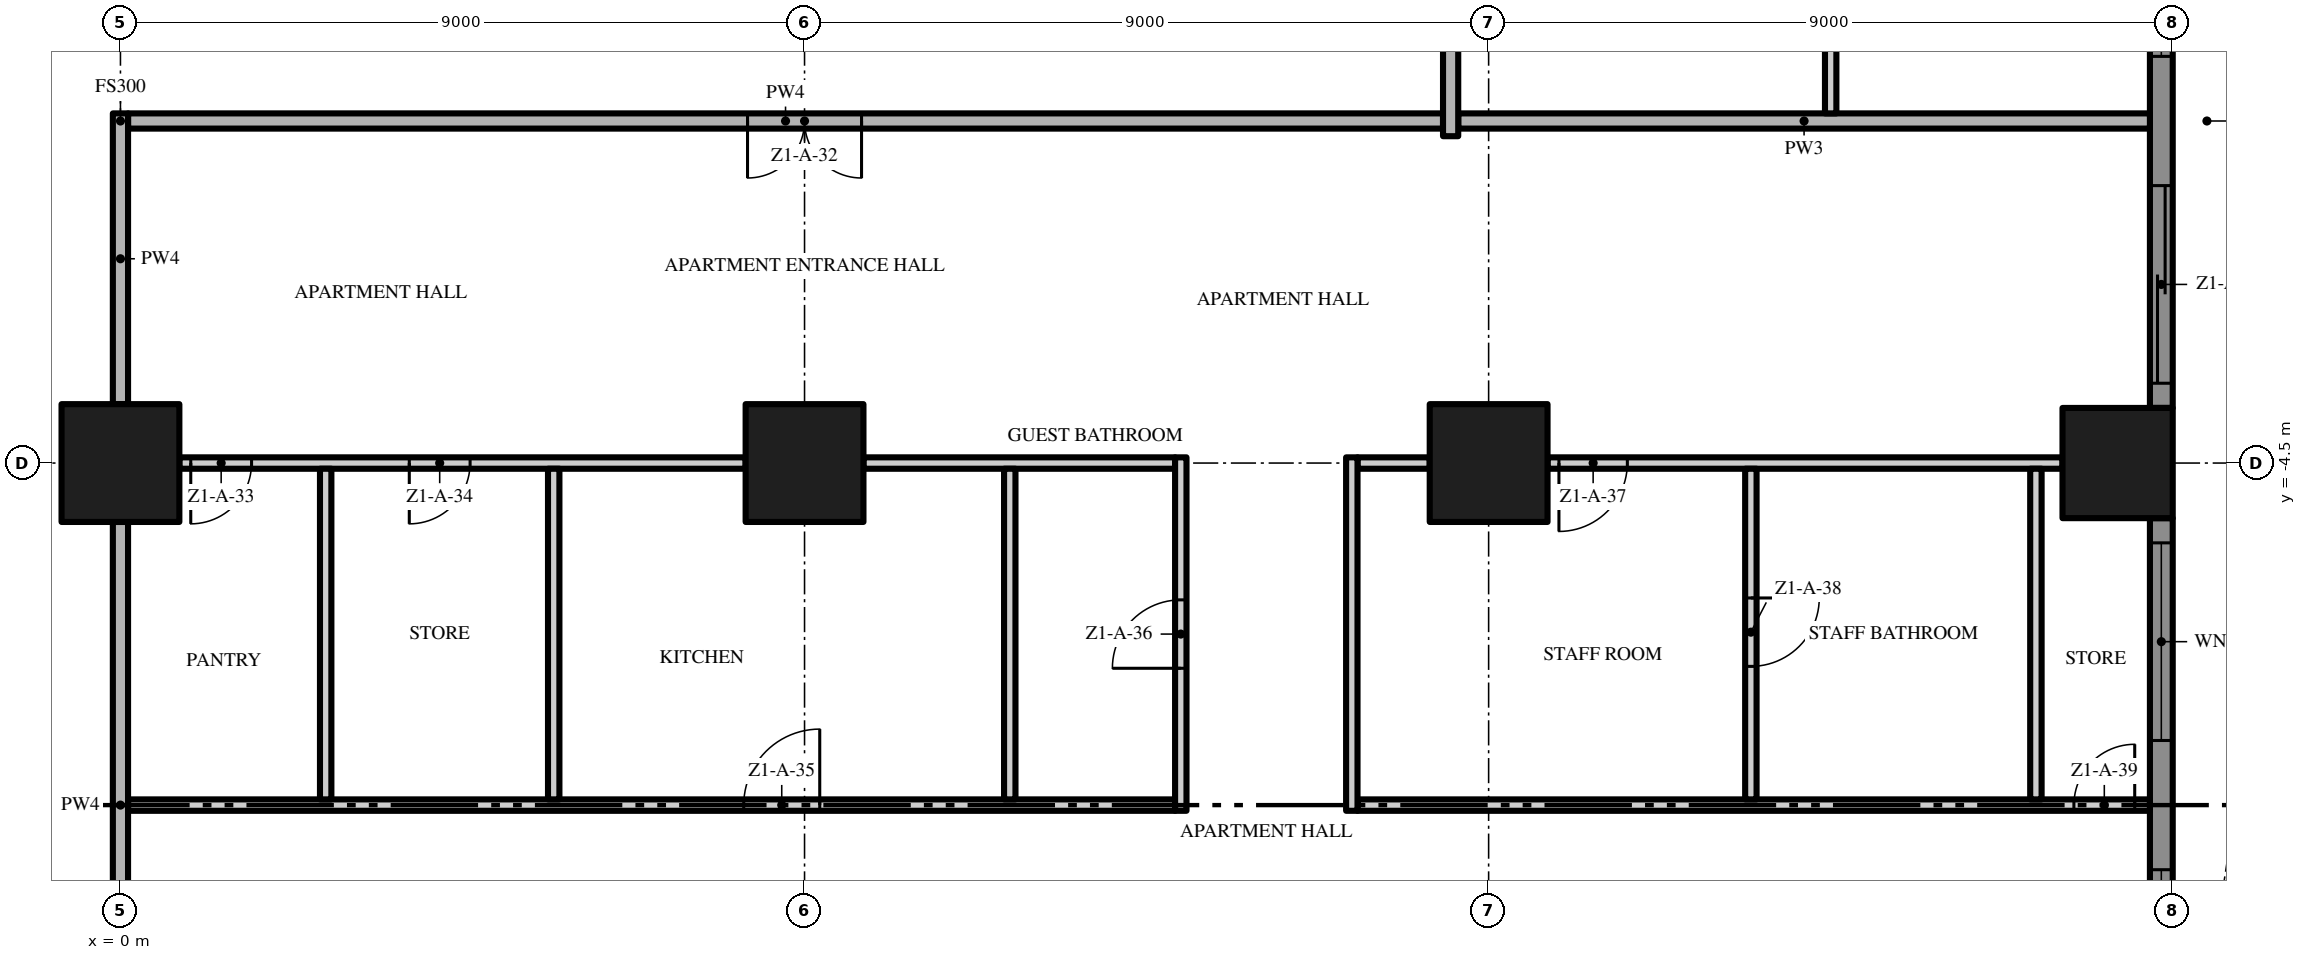
"""IFC4 building model, lengths in metres.
Left out: names, types, materials, properties, quantities, classifications, styles, units other than length and angle.
Written with IfcOpenShell. Run it as: python <this file> out.ifc"""

import sys

from ifc_helpers import new_model, si_unit, direction, frame, frame_2d, origin, origin_2d, place, context, subcontext, project, spatial, polyline, rectangle, outline, extrude, element, fill, save


model = new_model("IFC4")
c1 = context("Model", 3, precision=1e-05, world=origin(), true_north=direction((0.0, 1.0)))
c2 = subcontext(c1, "Body", "Model", "MODEL_VIEW")
j1 = project(units=[si_unit("LENGTHUNIT", "METRE"), si_unit("PLANEANGLEUNIT", "RADIAN")], contexts=[c1])
p1 = place(None, origin())
s1 = spatial("IfcSite", under=j1, at=p1, CompositionType="ELEMENT")
p2 = place(p1, origin())
s2 = spatial("IfcBuilding", under=s1, at=p2, CompositionType="ELEMENT")
p3 = place(p2, frame((0.0, 0.0, 22.6)))
s3 = spatial("IfcBuildingStorey", under=s2, at=p3, CompositionType="ELEMENT", Elevation=22.6)
for number, where, z_axis, x_axis in (
    (1, (0.0, -4.5, 0.0), (0.0, 0.0, 1.0), (1.0, 0.0, 0.0)),
    (2, (18.0, -4.5, 0.0), (0.0, 0.0, 1.0), (1.0, 0.0, 0.0)),
):
    element("IfcColumn", number, at=place(p3, frame(where, z_axis=z_axis, x_axis=x_axis)), inside=s3, PredefinedType="COLUMN", context=c2, shape_type="SweptSolid", body=[
        extrude(rectangle(XDim=1.55, YDim=1.55, at=origin_2d()), origin(), (0.0, 0.0, 1.0), 3.5),
    ])
p4 = place(p3, frame((26.275, -4.5, 0.0), z_axis=(0.0, 0.0, 1.0), x_axis=(1.0, 0.0, 0.0)))
e3 = element("IfcColumn", 3, at=p4, inside=s3, PredefinedType="COLUMN", context=c2, shape_type="SweptSolid", body=[
    extrude(rectangle(XDim=1.45, YDim=1.45, at=origin_2d()), origin(), (0.0, 0.0, 1.0), 3.5),
])
p5 = place(p3, frame((9.0, -4.5, 0.0), z_axis=(0.0, 0.0, 1.0), x_axis=(1.0, 0.0, 0.0)))
e4 = element("IfcColumn", 4, at=p5, inside=s3, PredefinedType="COLUMN", context=c2, shape_type="SweptSolid", body=[
    extrude(rectangle(XDim=1.55, YDim=1.55, at=origin_2d()), origin(), (0.0, 0.0, 1.0), 3.5),
])
p6 = place(p3, frame((26.85, -5.225, 0.0), z_axis=(0.0, 0.0, 1.0), x_axis=(0.0, -1.0, 0.0)))
e5 = element("IfcWall", 5, at=p6, inside=s3, PredefinedType="SOLIDWALL", context=c2, shape_type="SweptSolid", body=[
    extrude(rectangle(XDim=7.55, YDim=0.3, at=frame_2d((3.775, 0.0))), origin(), (0.0, 0.0, 1.0), 3.5),
])
p7 = place(p6, frame((4.625, 0.0, 0.45)))
e6 = element("IfcOpeningElement", 6, at=p7, cuts=e5, PredefinedType="OPENING", context=c2, shape_type="SweptSolid", body=[
    extrude(rectangle(XDim=2.6, YDim=2.65, at=frame_2d((1.3, 1.325))), frame((0.0, 0.16, 0.0), z_axis=(0.0, -1.0, 0.0), x_axis=(1.0, 0.0, 0.0)), (0.0, 0.0, 1.0), 0.32),
])
p8 = place(p6, frame((0.325, 0.0, 0.45)))
e7 = element("IfcOpeningElement", 7, at=p8, cuts=e5, PredefinedType="OPENING", context=c2, shape_type="SweptSolid", body=[
    extrude(rectangle(XDim=2.6, YDim=2.65, at=frame_2d((1.3, 1.325))), frame((0.0, 0.16, 0.0), z_axis=(0.0, -1.0, 0.0), x_axis=(1.0, 0.0, 0.0)), (0.0, 0.0, 1.0), 0.32),
])
p9 = place(p3, frame((26.85, 3.775, 0.0), z_axis=(0.0, 0.0, 1.0), x_axis=(0.0, -1.0, 0.0)))
e8 = element("IfcWall", 8, at=p9, inside=s3, PredefinedType="SOLIDWALL", context=c2, shape_type="SweptSolid", body=[
    extrude(rectangle(XDim=7.55, YDim=0.3, at=frame_2d((3.775, 0.0))), origin(), (0.0, 0.0, 1.0), 3.5),
])
p10 = place(p9, frame((4.625, 0.0, 0.0)))
e9 = element("IfcOpeningElement", 9, at=p10, cuts=e8, PredefinedType="OPENING", context=c2, shape_type="SweptSolid", body=[
    extrude(rectangle(XDim=2.6, YDim=2.4, at=frame_2d((1.3, 1.2))), frame((0.0, 0.16, 0.0), z_axis=(0.0, -1.0, 0.0), x_axis=(1.0, 0.0, 0.0)), (0.0, 0.0, 1.0), 0.32),
])
p11 = place(p9, frame((0.325, 0.0, 0.45)))
e10 = element("IfcOpeningElement", 10, at=p11, cuts=e8, PredefinedType="OPENING", context=c2, shape_type="SweptSolid", body=[
    extrude(rectangle(XDim=2.6, YDim=2.65, at=frame_2d((1.3, 1.325))), frame((0.0, 0.16, 0.0), z_axis=(0.0, -1.0, 0.0), x_axis=(1.0, 0.0, 0.0)), (0.0, 0.0, 1.0), 0.32),
])
p12 = place(p3, origin())
e11 = element("IfcWall", 11, at=p12, inside=s3, PredefinedType="USERDEFINED", context=c2, shape_type="SweptSolid", body=[
    extrude(outline(polyline([(30.0, -18.0), (29.771, -16.5), (29.171, -15.0), (28.429, -13.5), (27.829, -12.0), (27.6, -10.5), (27.829, -9.0), (28.429, -7.5), (29.171, -6.0), (29.771, -4.5), (30.0, -3.0), (29.771, -1.5), (29.171, 0.0), (28.429, 1.5), (27.829, 3.0), (27.6, 4.5), (27.829, 6.0), (28.429, 7.5), (29.171, 9.0), (29.771, 10.5), (30.0, 12.0), (29.771, 13.5), (29.171, 15.0), (28.429, 16.5), (27.829, 18.0), (27.597, 17.907), (28.201, 16.398), (28.942, 14.898), (29.528, 13.434), (29.747, 12.0), (29.528, 10.566), (28.942, 9.102), (28.201, 7.602), (27.586, 6.066), (27.347, 4.5), (27.586, 2.934), (28.201, 1.398), (28.942, -0.102), (29.528, -1.566), (29.747, -3.0), (29.528, -4.434), (28.942, -5.898), (28.201, -7.398), (27.586, -8.934), (27.347, -10.5), (27.586, -12.066), (28.201, -13.602), (28.942, -15.102), (29.528, -16.566), (29.753, -18.038), (30.0, -18.0)])), origin(), (0.0, 0.0, 1.0), 0.9),
])
p13 = place(p3, frame((0.1, -9.0, 0.0), z_axis=(0.0, 0.0, 1.0), x_axis=(1.0, 0.0, 0.0)))
e12 = element("IfcWall", 12, at=p13, inside=s3, PredefinedType="PARTITIONING", context=c2, shape_type="SweptSolid", body=[
    extrude(rectangle(XDim=13.775, YDim=0.15, at=frame_2d((6.888, 0.0))), origin(), (0.0, 0.0, 1.0), 3.5),
])
p14 = place(p13, frame((8.1, 0.0, 0.0)))
e13 = element("IfcOpeningElement", 13, at=p14, cuts=e12, PredefinedType="OPENING", context=c2, shape_type="SweptSolid", body=[
    extrude(rectangle(XDim=1.0, YDim=2.4, at=frame_2d((0.5, 1.2))), frame((0.0, 0.085, 0.0), z_axis=(0.0, -1.0, 0.0), x_axis=(1.0, 0.0, 0.0)), (0.0, 0.0, 1.0), 0.17),
])
p15 = place(p3, frame((16.275, -9.0, 0.0), z_axis=(0.0, 0.0, 1.0), x_axis=(1.0, 0.0, 0.0)))
e14 = element("IfcWall", 14, at=p15, inside=s3, PredefinedType="PARTITIONING", context=c2, shape_type="SweptSolid", body=[
    extrude(rectangle(XDim=10.425, YDim=0.15, at=frame_2d((5.213, 0.0))), origin(), (0.0, 0.0, 1.0), 3.5),
])
p16 = place(p15, frame((9.425, 0.0, 0.0)))
e15 = element("IfcOpeningElement", 15, at=p16, cuts=e14, PredefinedType="OPENING", context=c2, shape_type="SweptSolid", body=[
    extrude(rectangle(XDim=0.8, YDim=2.0, at=frame_2d((0.4, 1.0))), frame((0.0, 0.085, 0.0), z_axis=(0.0, -1.0, 0.0), x_axis=(1.0, 0.0, 0.0)), (0.0, 0.0, 1.0), 0.17),
])
p17 = place(p3, frame((8.225, -4.5, 0.0), z_axis=(0.0, 0.0, 1.0), x_axis=(-1.0, 0.0, 0.0)))
e16 = element("IfcWall", 16, at=p17, inside=s3, PredefinedType="PARTITIONING", context=c2, shape_type="SweptSolid", body=[
    extrude(rectangle(XDim=7.45, YDim=0.15, at=frame_2d((3.725, 0.0))), origin(), (0.0, 0.0, 1.0), 3.5),
])
p18 = place(p17, frame((6.5, 0.0, 0.0)))
e17 = element("IfcOpeningElement", 17, at=p18, cuts=e16, PredefinedType="OPENING", context=c2, shape_type="SweptSolid", body=[
    extrude(rectangle(XDim=0.8, YDim=2.0, at=frame_2d((0.4, 1.0))), frame((0.0, 0.085, 0.0), z_axis=(0.0, -1.0, 0.0), x_axis=(1.0, 0.0, 0.0)), (0.0, 0.0, 1.0), 0.17),
])
p19 = place(p17, frame((3.625, 0.0, 0.0)))
e18 = element("IfcOpeningElement", 18, at=p19, cuts=e16, PredefinedType="OPENING", context=c2, shape_type="SweptSolid", body=[
    extrude(rectangle(XDim=0.8, YDim=2.0, at=frame_2d((0.4, 1.0))), frame((0.0, 0.085, 0.0), z_axis=(0.0, -1.0, 0.0), x_axis=(1.0, 0.0, 0.0)), (0.0, 0.0, 1.0), 0.17),
])
p20 = place(p3, frame((9.775, -4.5, 0.0), z_axis=(0.0, 0.0, 1.0), x_axis=(1.0, 0.0, 0.0)))
e19 = element("IfcWall", 19, at=p20, inside=s3, PredefinedType="PARTITIONING", context=c2, shape_type="SweptSolid", body=[
    extrude(rectangle(XDim=4.1, YDim=0.15, at=frame_2d((2.05, 0.0))), origin(), (0.0, 0.0, 1.0), 3.5),
])
p21 = place(p3, frame((16.275, -4.5, 0.0), z_axis=(0.0, 0.0, 1.0), x_axis=(1.0, 0.0, 0.0)))
e20 = element("IfcWall", 20, at=p21, inside=s3, PredefinedType="PARTITIONING", context=c2, shape_type="SweptSolid", body=[
    extrude(rectangle(XDim=0.95, YDim=0.15, at=frame_2d((0.475, 0.0))), origin(), (0.0, 0.0, 1.0), 3.5),
])
p22 = place(p3, frame((25.55, -4.5, 0.0), z_axis=(0.0, 0.0, 1.0), x_axis=(-1.0, 0.0, 0.0)))
e21 = element("IfcWall", 21, at=p22, inside=s3, PredefinedType="PARTITIONING", context=c2, shape_type="SweptSolid", body=[
    extrude(rectangle(XDim=6.775, YDim=0.15, at=frame_2d((3.388, 0.0))), origin(), (0.0, 0.0, 1.0), 3.5),
])
p23 = place(p22, frame((5.725, 0.0, 0.0)))
e22 = element("IfcOpeningElement", 22, at=p23, cuts=e21, PredefinedType="OPENING", context=c2, shape_type="SweptSolid", body=[
    extrude(rectangle(XDim=0.9, YDim=2.1, at=frame_2d((0.45, 1.05))), frame((0.0, 0.085, 0.0), z_axis=(0.0, -1.0, 0.0), x_axis=(1.0, 0.0, 0.0)), (0.0, 0.0, 1.0), 0.17),
])
p24 = place(p3, frame((17.4, 0.0, 0.0), z_axis=(0.0, 0.0, 1.0), x_axis=(-1.0, 0.0, 0.0)))
e23 = element("IfcWall", 23, at=p24, inside=s3, PredefinedType="PARTITIONING", context=c2, shape_type="SweptSolid", body=[
    extrude(rectangle(XDim=17.3, YDim=0.2, at=frame_2d((8.65, 0.0))), origin(), (0.0, 0.0, 1.0), 3.5),
])
p25 = place(p24, frame((7.65, 0.0, 0.0)))
e24 = element("IfcOpeningElement", 24, at=p25, cuts=e23, PredefinedType="OPENING", context=c2, shape_type="SweptSolid", body=[
    extrude(rectangle(XDim=1.5, YDim=2.4, at=frame_2d((0.75, 1.2))), frame((0.0, 0.11, 0.0), z_axis=(0.0, -1.0, 0.0), x_axis=(1.0, 0.0, 0.0)), (0.0, 0.0, 1.0), 0.22),
])
p26 = place(p3, frame((17.6, 0.0, 0.0), z_axis=(0.0, 0.0, 1.0), x_axis=(1.0, 0.0, 0.0)))
e25 = element("IfcWall", 25, at=p26, inside=s3, PredefinedType="PARTITIONING", context=c2, shape_type="SweptSolid", body=[
    extrude(rectangle(XDim=9.1, YDim=0.2, at=frame_2d((4.55, 0.0))), origin(), (0.0, 0.0, 1.0), 3.5),
])
p27 = place(p3, frame((0.0, -12.725, 0.0), z_axis=(0.0, 0.0, 1.0), x_axis=(0.0, 1.0, 0.0)))
e26 = element("IfcWall", 26, at=p27, inside=s3, PredefinedType="PARTITIONING", context=c2, shape_type="SweptSolid", body=[
    extrude(rectangle(XDim=7.45, YDim=0.2, at=frame_2d((3.725, 0.0))), origin(), (0.0, 0.0, 1.0), 3.5),
])
p28 = place(p3, frame((0.0, -3.725, 0.0), z_axis=(0.0, 0.0, 1.0), x_axis=(0.0, 1.0, 0.0)))
e27 = element("IfcWall", 27, at=p28, inside=s3, PredefinedType="PARTITIONING", context=c2, shape_type="SweptSolid", body=[
    extrude(rectangle(XDim=3.825, YDim=0.2, at=frame_2d((1.913, 0.0))), origin(), (0.0, 0.0, 1.0), 3.5),
])
for number, where, z_axis, x_axis in (
    (28, (2.7, -8.925, 0.0), (0.0, 0.0, 1.0), (0.0, 1.0, 0.0)),
    (29, (5.7, -8.925, 0.0), (0.0, 0.0, 1.0), (0.0, 1.0, 0.0)),
    (30, (11.7, -8.925, 0.0), (0.0, 0.0, 1.0), (0.0, 1.0, 0.0)),
):
    element("IfcWall", number, at=place(p3, frame(where, z_axis=z_axis, x_axis=x_axis)), inside=s3, PredefinedType="PARTITIONING", context=c2, shape_type="SweptSolid", body=[
        extrude(rectangle(XDim=4.35, YDim=0.15, at=frame_2d((2.175, 0.0))), origin(), (0.0, 0.0, 1.0), 3.5),
    ])
p29 = place(p3, frame((13.95, -9.075, 0.0), z_axis=(0.0, 0.0, 1.0), x_axis=(0.0, 1.0, 0.0)))
e31 = element("IfcWall", 31, at=p29, inside=s3, PredefinedType="PARTITIONING", context=c2, shape_type="SweptSolid", body=[
    extrude(rectangle(XDim=4.65, YDim=0.15, at=frame_2d((2.325, 0.0))), origin(), (0.0, 0.0, 1.0), 3.5),
])
p30 = place(p29, frame((1.875, 0.0, 0.0)))
e32 = element("IfcOpeningElement", 32, at=p30, cuts=e31, PredefinedType="OPENING", context=c2, shape_type="SweptSolid", body=[
    extrude(rectangle(XDim=0.9, YDim=2.1, at=frame_2d((0.45, 1.05))), frame((0.0, 0.085, 0.0), z_axis=(0.0, -1.0, 0.0), x_axis=(1.0, 0.0, 0.0)), (0.0, 0.0, 1.0), 0.17),
])
p31 = place(p3, frame((16.2, -9.075, 0.0), z_axis=(0.0, 0.0, 1.0), x_axis=(0.0, 1.0, 0.0)))
e33 = element("IfcWall", 33, at=p31, inside=s3, PredefinedType="PARTITIONING", context=c2, shape_type="SweptSolid", body=[
    extrude(rectangle(XDim=4.65, YDim=0.15, at=frame_2d((2.325, 0.0))), origin(), (0.0, 0.0, 1.0), 3.5),
])
p32 = place(p3, frame((17.5, -0.2, 0.0), z_axis=(0.0, 0.0, 1.0), x_axis=(0.0, 1.0, 0.0)))
e34 = element("IfcWall", 34, at=p32, inside=s3, PredefinedType="PARTITIONING", context=c2, shape_type="SweptSolid", body=[
    extrude(rectangle(XDim=3.925, YDim=0.2, at=frame_2d((1.962, 0.0))), origin(), (0.0, 0.0, 1.0), 3.5),
])
p33 = place(p3, frame((21.45, -4.575, 0.0), z_axis=(0.0, 0.0, 1.0), x_axis=(0.0, -1.0, 0.0)))
e35 = element("IfcWall", 35, at=p33, inside=s3, PredefinedType="PARTITIONING", context=c2, shape_type="SweptSolid", body=[
    extrude(rectangle(XDim=4.35, YDim=0.15, at=frame_2d((2.175, 0.0))), origin(), (0.0, 0.0, 1.0), 3.5),
])
p34 = place(p33, frame((1.7, 0.0, 0.0)))
e36 = element("IfcOpeningElement", 36, at=p34, cuts=e35, PredefinedType="OPENING", context=c2, shape_type="SweptSolid", body=[
    extrude(rectangle(XDim=0.9, YDim=2.1, at=frame_2d((0.45, 1.05))), frame((0.0, 0.085, 0.0), z_axis=(0.0, -1.0, 0.0), x_axis=(1.0, 0.0, 0.0)), (0.0, 0.0, 1.0), 0.17),
])
p35 = place(p3, frame((22.5, 17.275, 0.0), z_axis=(0.0, 0.0, 1.0), x_axis=(0.0, -1.0, 0.0)))
e37 = element("IfcWall", 37, at=p35, inside=s3, PredefinedType="PARTITIONING", context=c2, shape_type="SweptSolid", body=[
    extrude(rectangle(XDim=17.175, YDim=0.15, at=frame_2d((8.588, 0.0))), origin(), (0.0, 0.0, 1.0), 3.5),
])
p36 = place(p35, frame((14.525, 0.0, 0.0)))
e38 = element("IfcOpeningElement", 38, at=p36, cuts=e37, PredefinedType="OPENING", context=c2, shape_type="SweptSolid", body=[
    extrude(rectangle(XDim=1.0, YDim=2.4, at=frame_2d((0.5, 1.2))), frame((0.0, 0.085, 0.0), z_axis=(0.0, -1.0, 0.0), x_axis=(1.0, 0.0, 0.0)), (0.0, 0.0, 1.0), 0.17),
])
p37 = place(p35, frame((8.925, 0.0, 0.0)))
e39 = element("IfcOpeningElement", 39, at=p37, cuts=e37, PredefinedType="OPENING", context=c2, shape_type="SweptSolid", body=[
    extrude(rectangle(XDim=1.0, YDim=2.4, at=frame_2d((0.5, 1.2))), frame((0.0, 0.085, 0.0), z_axis=(0.0, -1.0, 0.0), x_axis=(1.0, 0.0, 0.0)), (0.0, 0.0, 1.0), 0.17),
])
p38 = place(p35, frame((6.675, 0.0, 0.0)))
e40 = element("IfcOpeningElement", 40, at=p38, cuts=e37, PredefinedType="OPENING", context=c2, shape_type="SweptSolid", body=[
    extrude(rectangle(XDim=1.0, YDim=2.4, at=frame_2d((0.5, 1.2))), frame((0.0, 0.085, 0.0), z_axis=(0.0, -1.0, 0.0), x_axis=(1.0, 0.0, 0.0)), (0.0, 0.0, 1.0), 0.17),
])
p39 = place(p35, frame((0.15, 0.0, 0.0)))
e41 = element("IfcOpeningElement", 41, at=p39, cuts=e37, PredefinedType="OPENING", context=c2, shape_type="SweptSolid", body=[
    extrude(rectangle(XDim=1.0, YDim=2.4, at=frame_2d((0.5, 1.2))), frame((0.0, 0.085, 0.0), z_axis=(0.0, -1.0, 0.0), x_axis=(1.0, 0.0, 0.0)), (0.0, 0.0, 1.0), 0.17),
])
p40 = place(p3, frame((25.2, -8.925, 0.0), z_axis=(0.0, 0.0, 1.0), x_axis=(0.0, 1.0, 0.0)))
e42 = element("IfcWall", 42, at=p40, inside=s3, PredefinedType="PARTITIONING", context=c2, shape_type="SweptSolid", body=[
    extrude(rectangle(XDim=4.35, YDim=0.15, at=frame_2d((2.175, 0.0))), origin(), (0.0, 0.0, 1.0), 3.5),
])
p41 = place(p7, origin())
e43 = element("IfcWindow", 43, at=p41, inside=s3, PartitioningType="SINGLE_PANEL", PredefinedType="WINDOW", context=c2, shape_type="SweptSolid", body=[
    extrude(rectangle(XDim=2.6, YDim=2.65, at=frame_2d((1.3, 1.325))), frame((0.0, 0.03, 0.0), z_axis=(0.0, -1.0, 0.0), x_axis=(1.0, 0.0, 0.0)), (0.0, 0.0, 1.0), 0.06),
])
fill(e6, e43)
p42 = place(p8, origin())
e44 = element("IfcWindow", 44, at=p42, inside=s3, PartitioningType="SINGLE_PANEL", PredefinedType="WINDOW", context=c2, shape_type="SweptSolid", body=[
    extrude(rectangle(XDim=2.6, YDim=2.65, at=frame_2d((1.3, 1.325))), frame((0.0, 0.03, 0.0), z_axis=(0.0, -1.0, 0.0), x_axis=(1.0, 0.0, 0.0)), (0.0, 0.0, 1.0), 0.06),
])
fill(e7, e44)
p43 = place(p10, origin())
e45 = element("IfcDoor", 45, at=p43, inside=s3, OperationType="SINGLE_SWING_LEFT", PredefinedType="DOOR", context=c2, shape_type="SweptSolid", body=[
    extrude(rectangle(XDim=2.6, YDim=2.4, at=frame_2d((1.3, 1.2))), frame((0.0, 0.025, 0.0), z_axis=(0.0, -1.0, 0.0), x_axis=(1.0, 0.0, 0.0)), (0.0, 0.0, 1.0), 0.05),
])
fill(e9, e45)
p44 = place(p11, origin())
e46 = element("IfcWindow", 46, at=p44, inside=s3, PartitioningType="SINGLE_PANEL", PredefinedType="WINDOW", context=c2, shape_type="SweptSolid", body=[
    extrude(rectangle(XDim=2.6, YDim=2.65, at=frame_2d((1.3, 1.325))), frame((0.0, 0.03, 0.0), z_axis=(0.0, -1.0, 0.0), x_axis=(1.0, 0.0, 0.0)), (0.0, 0.0, 1.0), 0.06),
])
fill(e10, e46)
p45 = place(p25, origin())
e47 = element("IfcDoor", 47, at=p45, inside=s3, OperationType="DOUBLE_DOOR_SINGLE_SWING", PredefinedType="DOOR", context=c2, shape_type="SweptSolid", body=[
    extrude(rectangle(XDim=1.5, YDim=2.4, at=frame_2d((0.75, 1.2))), frame((0.0, 0.025, 0.0), z_axis=(0.0, -1.0, 0.0), x_axis=(1.0, 0.0, 0.0)), (0.0, 0.0, 1.0), 0.05),
])
fill(e24, e47)
p46 = place(p18, origin())
e48 = element("IfcDoor", 48, at=p46, inside=s3, OperationType="SINGLE_SWING_RIGHT", PredefinedType="DOOR", context=c2, shape_type="SweptSolid", body=[
    extrude(rectangle(XDim=0.8, YDim=2.0, at=frame_2d((0.4, 1.0))), frame((0.0, 0.025, 0.0), z_axis=(0.0, -1.0, 0.0), x_axis=(1.0, 0.0, 0.0)), (0.0, 0.0, 1.0), 0.05),
])
fill(e17, e48)
p47 = place(p19, origin())
e49 = element("IfcDoor", 49, at=p47, inside=s3, OperationType="SINGLE_SWING_RIGHT", PredefinedType="DOOR", context=c2, shape_type="SweptSolid", body=[
    extrude(rectangle(XDim=0.8, YDim=2.0, at=frame_2d((0.4, 1.0))), frame((0.0, 0.025, 0.0), z_axis=(0.0, -1.0, 0.0), x_axis=(1.0, 0.0, 0.0)), (0.0, 0.0, 1.0), 0.05),
])
fill(e18, e49)
p48 = place(p14, origin())
e50 = element("IfcDoor", 50, at=p48, inside=s3, OperationType="SINGLE_SWING_RIGHT", PredefinedType="DOOR", context=c2, shape_type="SweptSolid", body=[
    extrude(rectangle(XDim=1.0, YDim=2.4, at=frame_2d((0.5, 1.2))), frame((0.0, 0.025, 0.0), z_axis=(0.0, -1.0, 0.0), x_axis=(1.0, 0.0, 0.0)), (0.0, 0.0, 1.0), 0.05),
])
fill(e13, e50)
p49 = place(p30, origin())
e51 = element("IfcDoor", 51, at=p49, inside=s3, OperationType="SINGLE_SWING_LEFT", PredefinedType="DOOR", context=c2, shape_type="SweptSolid", body=[
    extrude(rectangle(XDim=0.9, YDim=2.1, at=frame_2d((0.45, 1.05))), frame((0.0, 0.025, 0.0), z_axis=(0.0, -1.0, 0.0), x_axis=(1.0, 0.0, 0.0)), (0.0, 0.0, 1.0), 0.05),
])
fill(e32, e51)
p50 = place(p23, origin())
e52 = element("IfcDoor", 52, at=p50, inside=s3, OperationType="SINGLE_SWING_RIGHT", PredefinedType="DOOR", context=c2, shape_type="SweptSolid", body=[
    extrude(rectangle(XDim=0.9, YDim=2.1, at=frame_2d((0.45, 1.05))), frame((0.0, 0.025, 0.0), z_axis=(0.0, -1.0, 0.0), x_axis=(1.0, 0.0, 0.0)), (0.0, 0.0, 1.0), 0.05),
])
fill(e22, e52)
p51 = place(p34, origin())
e53 = element("IfcDoor", 53, at=p51, inside=s3, OperationType="SINGLE_SWING_LEFT", PredefinedType="DOOR", context=c2, shape_type="SweptSolid", body=[
    extrude(rectangle(XDim=0.9, YDim=2.1, at=frame_2d((0.45, 1.05))), frame((0.0, 0.025, 0.0), z_axis=(0.0, -1.0, 0.0), x_axis=(1.0, 0.0, 0.0)), (0.0, 0.0, 1.0), 0.05),
])
fill(e36, e53)
p52 = place(p16, origin())
e54 = element("IfcDoor", 54, at=p52, inside=s3, OperationType="SINGLE_SWING_RIGHT", PredefinedType="DOOR", context=c2, shape_type="SweptSolid", body=[
    extrude(rectangle(XDim=0.8, YDim=2.0, at=frame_2d((0.4, 1.0))), frame((0.0, 0.025, 0.0), z_axis=(0.0, -1.0, 0.0), x_axis=(1.0, 0.0, 0.0)), (0.0, 0.0, 1.0), 0.05),
])
fill(e15, e54)
save(model, sys.argv[1])
